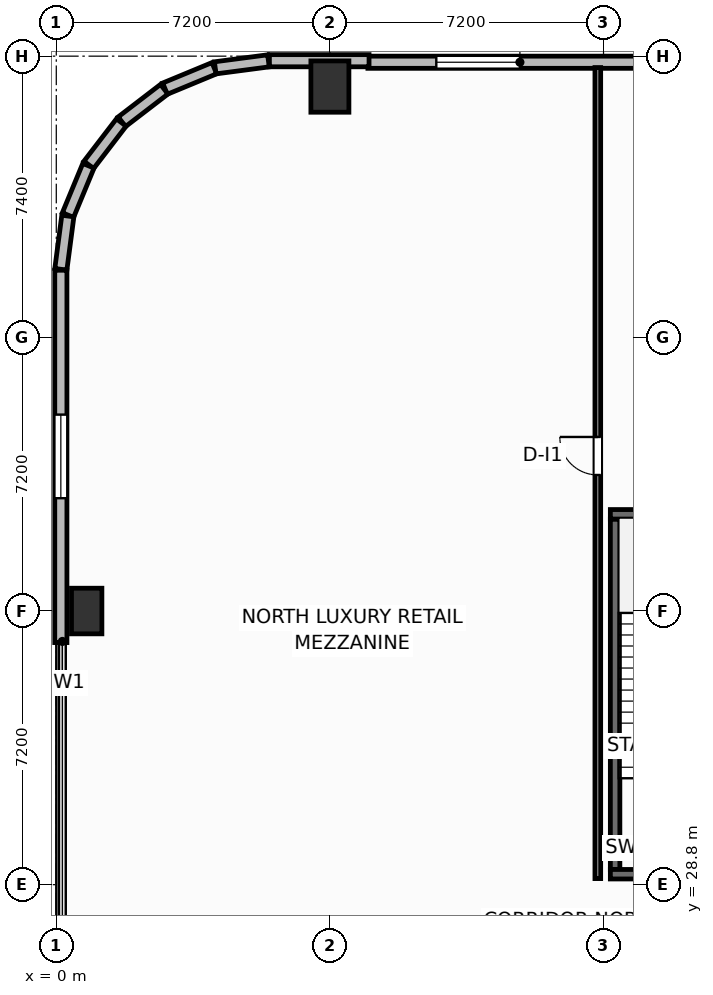
"""IFC4 building model, lengths in metres.
Left out: names, types, materials, properties, quantities, classifications, styles, units other than length and angle.
Written with IfcOpenShell. Run it as: python <this file> out.ifc"""

import sys

from ifc_helpers import new_model, si_unit, direction, frame, frame_2d, origin, origin_2d, place, context, subcontext, project, spatial, rectangle, extrude, element, fill, save


model = new_model("IFC4")
c1 = context("Model", 3, precision=1e-05, world=origin(), true_north=direction((0.0, 1.0)))
c2 = subcontext(c1, "Body", "Model", "MODEL_VIEW")
j1 = project(units=[si_unit("LENGTHUNIT", "METRE"), si_unit("PLANEANGLEUNIT", "RADIAN")], contexts=[c1])
p1 = place(None, origin())
s1 = spatial("IfcSite", under=j1, at=p1, CompositionType="ELEMENT")
p2 = place(p1, origin())
s2 = spatial("IfcBuilding", under=s1, at=p2, CompositionType="ELEMENT")
p3 = place(p2, frame((0.0, 0.0, 5.4)))
s3 = spatial("IfcBuildingStorey", under=s2, at=p3, CompositionType="ELEMENT", Elevation=5.4)
p4 = place(p3, frame((14.705, 29.2, 0.0), z_axis=(0.0, 0.0, 1.0), x_axis=(0.0, 1.0, 0.0)))
e1 = element("IfcWall", 1, at=p4, inside=s3, PredefinedType="SHEAR", context=c2, shape_type="SweptSolid", body=[
    extrude(rectangle(XDim=9.22, YDim=0.25, at=frame_2d((4.61, 0.0))), origin(), (0.0, 0.0, 1.0), 5.12),
])
for number, where, z_axis, x_axis in (
    (2, (14.58, 38.545, 0.0), (0.0, 0.0, 1.0), (1.0, 0.0, 0.0)),
    (3, (14.58, 29.075, 0.0), (0.0, 0.0, 1.0), (1.0, 0.0, 0.0)),
):
    element("IfcWall", number, at=place(p3, frame(where, z_axis=z_axis, x_axis=x_axis)), inside=s3, PredefinedType="SHEAR", context=c2, shape_type="SweptSolid", body=[
        extrude(rectangle(XDim=3.89, YDim=0.25, at=frame_2d((1.945, 0.0))), origin(), (0.0, 0.0, 1.0), 5.12),
    ])
p5 = place(p3, frame((7.2, 49.8, 0.0), z_axis=(0.0, 0.0, 1.0), x_axis=(1.0, 0.0, 0.0)))
e4 = element("IfcColumn", 4, at=p5, inside=s3, PredefinedType="COLUMN", context=c2, shape_type="SweptSolid", body=[
    extrude(rectangle(XDim=1.0, YDim=1.35, at=origin_2d()), origin(), (0.0, 0.0, 1.0), 5.4),
])
p6 = place(p3, frame((0.8, 36.0, 0.0), z_axis=(0.0, 0.0, 1.0), x_axis=(1.0, 0.0, 0.0)))
e5 = element("IfcColumn", 5, at=p6, inside=s3, PredefinedType="PILASTER", context=c2, shape_type="SweptSolid", body=[
    extrude(rectangle(XDim=0.8, YDim=1.2, at=origin_2d()), origin(), (0.0, 0.0, 1.0), 5.4),
])
p7 = place(p3, frame((8.2, 50.44, 0.0), z_axis=(0.0, 0.0, 1.0), x_axis=(1.0, 0.0, 0.0)))
e6 = element("IfcWall", 6, at=p7, inside=s3, PredefinedType="SOLIDWALL", context=c2, shape_type="SweptSolid", body=[
    extrude(rectangle(XDim=15.2, YDim=0.32, at=frame_2d((7.6, 0.0))), origin(), (0.0, 0.0, 1.0), 4.07),
])
p8 = place(p7, frame((1.8, 0.0, 0.8)))
e7 = element("IfcOpeningElement", 7, at=p8, cuts=e6, PredefinedType="OPENING", context=c2, shape_type="SweptSolid", body=[
    extrude(rectangle(XDim=2.2, YDim=1.85, at=frame_2d((1.1, 0.925))), frame((0.0, 0.17, 0.0), z_axis=(0.0, -1.0, 0.0), x_axis=(1.0, 0.0, 0.0)), (0.0, 0.0, 1.0), 0.34),
])
p9 = place(p7, frame((11.2, 0.0, 0.8)))
e8 = element("IfcOpeningElement", 8, at=p9, cuts=e6, PredefinedType="OPENING", context=c2, shape_type="SweptSolid", body=[
    extrude(rectangle(XDim=2.2, YDim=1.85, at=frame_2d((1.1, 0.925))), frame((0.0, 0.17, 0.0), z_axis=(0.0, -1.0, 0.0), x_axis=(1.0, 0.0, 0.0)), (0.0, 0.0, 1.0), 0.34),
])
p10 = place(p3, frame((8.23, 50.48, 0.0), z_axis=(0.0, 0.0, 1.0), x_axis=(-1.0, 0.0, 0.0)))
e9 = element("IfcWall", 9, at=p10, inside=s3, PredefinedType="SOLIDWALL", context=c2, shape_type="SweptSolid", body=[
    extrude(rectangle(XDim=2.622, YDim=0.32, at=frame_2d((1.311, 0.0))), origin(), (0.0, 0.0, 1.0), 4.07),
])
p11 = place(p3, frame((5.583, 50.477, 0.0), z_axis=(0.0, 0.0, 1.0), x_axis=(-0.991434880626, -0.130601981138, 0.0)))
e10 = element("IfcWall", 10, at=p11, inside=s3, PredefinedType="SOLIDWALL", context=c2, shape_type="SweptSolid", body=[
    extrude(rectangle(XDim=1.413, YDim=0.32, at=frame_2d((0.707, 0.0))), origin(), (0.0, 0.0, 1.0), 4.07),
])
p12 = place(p3, frame((4.159, 50.283, 0.0), z_axis=(0.0, 0.0, 1.0), x_axis=(-0.923841042178, -0.382776343035, 0.0)))
e11 = element("IfcWall", 11, at=p12, inside=s3, PredefinedType="SOLIDWALL", context=c2, shape_type="SweptSolid", body=[
    extrude(rectangle(XDim=1.405, YDim=0.32, at=frame_2d((0.703, 0.0))), origin(), (0.0, 0.0, 1.0), 4.07),
])
p13 = place(p3, frame((2.841, 49.73, 0.0), z_axis=(0.0, 0.0, 1.0), x_axis=(-0.79338541907, -0.60871962085, 0.0)))
e12 = element("IfcWall", 12, at=p13, inside=s3, PredefinedType="SOLIDWALL", context=c2, shape_type="SweptSolid", body=[
    extrude(rectangle(XDim=1.405, YDim=0.32, at=frame_2d((0.703, 0.0))), origin(), (0.0, 0.0, 1.0), 4.07),
])
p14 = place(p3, frame((1.711, 48.854, 0.0), z_axis=(0.0, 0.0, 1.0), x_axis=(-0.608828954222, -0.793301521807, 0.0)))
e13 = element("IfcWall", 13, at=p14, inside=s3, PredefinedType="SOLIDWALL", context=c2, shape_type="SweptSolid", body=[
    extrude(rectangle(XDim=1.406, YDim=0.32, at=frame_2d((0.703, 0.0))), origin(), (0.0, 0.0, 1.0), 4.07),
])
p15 = place(p3, frame((0.846, 47.716, 0.0), z_axis=(0.0, 0.0, 1.0), x_axis=(-0.382924622758, -0.923779591291, 0.0)))
e14 = element("IfcWall", 14, at=p15, inside=s3, PredefinedType="SOLIDWALL", context=c2, shape_type="SweptSolid", body=[
    extrude(rectangle(XDim=1.405, YDim=0.32, at=frame_2d((0.703, 0.0))), origin(), (0.0, 0.0, 1.0), 4.07),
])
p16 = place(p3, frame((0.304, 46.393, 0.0), z_axis=(0.0, 0.0, 1.0), x_axis=(-0.130432168094, -0.991457235349, 0.0)))
e15 = element("IfcWall", 15, at=p16, inside=s3, PredefinedType="SOLIDWALL", context=c2, shape_type="SweptSolid", body=[
    extrude(rectangle(XDim=1.413, YDim=0.32, at=frame_2d((0.707, 0.0))), origin(), (0.0, 0.0, 1.0), 4.07),
])
p17 = place(p3, frame((0.12, 44.967, 0.0), z_axis=(0.0, 0.0, 1.0), x_axis=(0.0, -1.0, 0.0)))
e16 = element("IfcWall", 16, at=p17, inside=s3, PredefinedType="SOLIDWALL", context=c2, shape_type="SweptSolid", body=[
    extrude(rectangle(XDim=9.797, YDim=0.32, at=frame_2d((4.898, 0.0))), origin(), (0.0, 0.0, 1.0), 4.07),
])
p18 = place(p17, frame((3.799, 0.0, 0.8)))
e17 = element("IfcOpeningElement", 17, at=p18, cuts=e16, PredefinedType="OPENING", context=c2, shape_type="SweptSolid", body=[
    extrude(rectangle(XDim=2.2, YDim=2.0, at=frame_2d((1.1, 1.0))), frame((0.0, 0.17, 0.0), z_axis=(0.0, -1.0, 0.0), x_axis=(1.0, 0.0, 0.0)), (0.0, 0.0, 1.0), 0.34),
])
p19 = place(p3, frame((14.25, 28.96, 0.0), z_axis=(0.0, 0.0, 1.0), x_axis=(0.0, 1.0, 0.0)))
e18 = element("IfcWall", 18, at=p19, inside=s3, PredefinedType="PARTITIONING", context=c2, shape_type="SweptSolid", body=[
    extrude(rectangle(XDim=21.34, YDim=0.15, at=frame_2d((10.67, 0.0))), origin(), (0.0, 0.0, 1.0), 5.12),
])
p20 = place(p19, frame((10.62, 0.0, 0.0)))
e19 = element("IfcOpeningElement", 19, at=p20, cuts=e18, PredefinedType="OPENING", context=c2, shape_type="SweptSolid", body=[
    extrude(rectangle(XDim=1.0, YDim=2.05, at=frame_2d((0.5, 1.025))), frame((0.0, 0.085, 0.0), z_axis=(0.0, -1.0, 0.0), x_axis=(1.0, 0.0, 0.0)), (0.0, 0.0, 1.0), 0.17),
])
p21 = place(p8, origin())
e20 = element("IfcWindow", 20, at=p21, inside=s3, PartitioningType="SINGLE_PANEL", PredefinedType="WINDOW", context=c2, shape_type="SweptSolid", body=[
    extrude(rectangle(XDim=2.2, YDim=1.85, at=frame_2d((1.1, 0.925))), frame((0.0, 0.03, 0.0), z_axis=(0.0, -1.0, 0.0), x_axis=(1.0, 0.0, 0.0)), (0.0, 0.0, 1.0), 0.06),
])
fill(e7, e20)
p22 = place(p18, origin())
e21 = element("IfcWindow", 21, at=p22, inside=s3, PartitioningType="SINGLE_PANEL", PredefinedType="WINDOW", context=c2, shape_type="SweptSolid", body=[
    extrude(rectangle(XDim=2.2, YDim=2.0, at=frame_2d((1.1, 1.0))), frame((0.0, 0.03, 0.0), z_axis=(0.0, -1.0, 0.0), x_axis=(1.0, 0.0, 0.0)), (0.0, 0.0, 1.0), 0.06),
])
fill(e17, e21)
p23 = place(p20, origin())
e22 = element("IfcDoor", 22, at=p23, inside=s3, OperationType="SINGLE_SWING_RIGHT", PredefinedType="DOOR", context=c2, shape_type="SweptSolid", body=[
    extrude(rectangle(XDim=1.0, YDim=2.05, at=frame_2d((0.5, 1.025))), frame((0.0, 0.025, 0.0), z_axis=(0.0, -1.0, 0.0), x_axis=(1.0, 0.0, 0.0)), (0.0, 0.0, 1.0), 0.05),
])
fill(e19, e22)
save(model, sys.argv[1])
